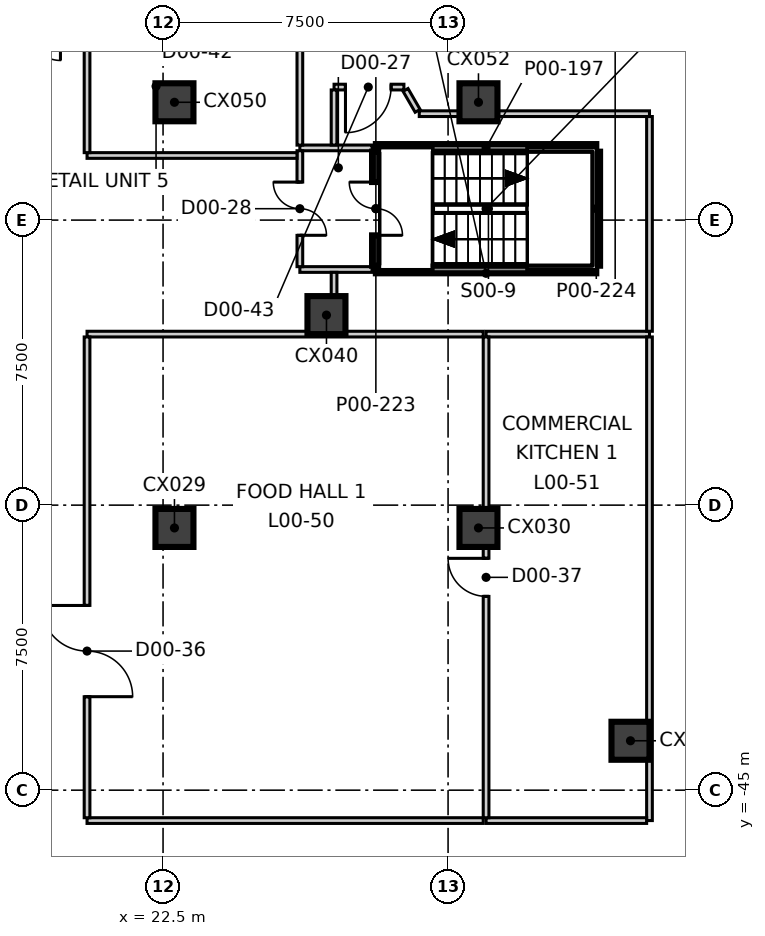
"""IFC4 building model, lengths in metres.
Left out: names, types, materials, properties, quantities, classifications, styles, units other than length and angle.
Written with IfcOpenShell. Run it as: python <this file> out.ifc"""

import sys

from ifc_helpers import new_model, si_unit, direction, frame, frame_2d, origin, origin_2d, place, context, subcontext, project, spatial, rectangle, extrude, element, fill, save


model = new_model("IFC4")
c1 = context("Model", 3, precision=1e-05, world=origin(), true_north=direction((0.0, 1.0)))
c2 = subcontext(c1, "Body", "Model", "MODEL_VIEW")
j1 = project(units=[si_unit("LENGTHUNIT", "METRE"), si_unit("PLANEANGLEUNIT", "RADIAN")], contexts=[c1])
p1 = place(None, origin())
s1 = spatial("IfcSite", under=j1, at=p1, CompositionType="ELEMENT")
p2 = place(p1, origin())
s2 = spatial("IfcBuilding", under=s1, at=p2, CompositionType="ELEMENT")
p3 = place(p2, origin())
s3 = spatial("IfcBuildingStorey", under=s2, at=p3, CompositionType="ELEMENT", Elevation=0.0)
for number, where, z_axis, x_axis in (
    (1, (34.8, -43.7, -0.4), (0.0, 0.0, 1.0), (1.0, 0.0, 0.0)),
    (2, (22.8, -38.1, -0.4), (0.0, 0.0, 1.0), (1.0, 0.0, 0.0)),
    (3, (30.8, -38.1, -0.4), (0.0, 0.0, 1.0), (1.0, 0.0, 0.0)),
    (4, (26.8, -32.5, -0.4), (0.0, 0.0, 1.0), (1.0, 0.0, 0.0)),
    (5, (22.8, -26.9, -0.4), (0.0, 0.0, 1.0), (1.0, 0.0, 0.0)),
    (6, (30.8, -26.9, -0.4), (0.0, 0.0, 1.0), (1.0, 0.0, 0.0)),
):
    element("IfcColumn", number, at=place(p3, frame(where, z_axis=z_axis, x_axis=x_axis)), inside=s3, PredefinedType="COLUMN", context=c2, shape_type="SweptSolid", body=[
        extrude(rectangle(XDim=1.0, YDim=1.0, at=origin_2d()), origin(), (0.0, 0.0, 1.0), 8.5),
    ])
for number, where, z_axis, x_axis in (
    (7, (26.1, -28.1, 0.0), (0.0, 0.0, 1.0), (1.0, 0.0, 0.0)),
    (8, (26.1, -31.3, 0.0), (0.0, 0.0, 1.0), (1.0, 0.0, 0.0)),
):
    element("IfcWall", number, at=place(p3, frame(where, z_axis=z_axis, x_axis=x_axis)), inside=s3, PredefinedType="PARTITIONING", context=c2, shape_type="SweptSolid", body=[
        extrude(rectangle(XDim=1.9, YDim=0.15, at=frame_2d((0.95, 0.0))), origin(), (0.0, 0.0, 1.0), 8.1),
    ])
p4 = place(p3, frame((26.1, -31.225, 0.0), z_axis=(0.0, 0.0, 1.0), x_axis=(0.0, 1.0, 0.0)))
e9 = element("IfcWall", 9, at=p4, inside=s3, PredefinedType="PARTITIONING", context=c2, shape_type="SweptSolid", body=[
    extrude(rectangle(XDim=3.05, YDim=0.15, at=frame_2d((1.525, 0.0))), origin(), (0.0, 0.0, 1.0), 8.1),
])
p5 = place(p4, frame((0.825, 0.0, 0.0)))
e10 = element("IfcOpeningElement", 10, at=p5, cuts=e9, PredefinedType="OPENING", context=c2, shape_type="SweptSolid", body=[
    extrude(rectangle(XDim=1.4, YDim=2.1, at=frame_2d((0.7, 1.05))), frame((0.0, 0.085, 0.0), z_axis=(0.0, -1.0, 0.0), x_axis=(1.0, 0.0, 0.0)), (0.0, 0.0, 1.0), 0.17),
])
p6 = place(p3, frame((31.0, -33.0, 0.0), z_axis=(0.0, 0.0, 1.0), x_axis=(1.0, 0.0, 0.0)))
e11 = element("IfcWall", 11, at=p6, inside=s3, PredefinedType="PARTITIONING", context=c2, shape_type="SweptSolid", body=[
    extrude(rectangle(XDim=4.3, YDim=0.15, at=frame_2d((2.15, 0.0))), origin(), (0.0, 0.0, 1.0), 8.1),
])
p7 = place(p3, frame((35.3, -45.8, 0.0), z_axis=(0.0, 0.0, 1.0), x_axis=(0.0, 1.0, 0.0)))
e12 = element("IfcWall", 12, at=p7, inside=s3, PredefinedType="PARTITIONING", context=c2, shape_type="SweptSolid", body=[
    extrude(rectangle(XDim=12.725, YDim=0.15, at=frame_2d((6.363, 0.0))), origin(), (0.0, 0.0, 1.0), 8.1),
])
p8 = place(p3, frame((31.0, -45.8, 0.0), z_axis=(0.0, 0.0, 1.0), x_axis=(1.0, 0.0, 0.0)))
e13 = element("IfcWall", 13, at=p8, inside=s3, PredefinedType="PARTITIONING", context=c2, shape_type="SweptSolid", body=[
    extrude(rectangle(XDim=4.225, YDim=0.15, at=frame_2d((2.113, 0.0))), origin(), (0.0, 0.0, 1.0), 8.1),
])
p9 = place(p3, frame((31.0, -45.725, 0.0), z_axis=(0.0, 0.0, 1.0), x_axis=(0.0, 1.0, 0.0)))
e14 = element("IfcWall", 14, at=p9, inside=s3, PredefinedType="PARTITIONING", context=c2, shape_type="SweptSolid", body=[
    extrude(rectangle(XDim=12.65, YDim=0.15, at=frame_2d((6.325, 0.0))), origin(), (0.0, 0.0, 1.0), 6.3),
])
p10 = place(p9, frame((5.825, 0.0, 0.0)))
e15 = element("IfcOpeningElement", 15, at=p10, cuts=e14, PredefinedType="OPENING", context=c2, shape_type="SweptSolid", body=[
    extrude(rectangle(XDim=1.0, YDim=2.1, at=frame_2d((0.5, 1.05))), frame((0.0, 0.085, 0.0), z_axis=(0.0, -1.0, 0.0), x_axis=(1.0, 0.0, 0.0)), (0.0, 0.0, 1.0), 0.17),
])
p11 = place(p3, frame((20.5, -33.0, 0.0), z_axis=(0.0, 0.0, 1.0), x_axis=(1.0, 0.0, 0.0)))
e16 = element("IfcWall", 16, at=p11, inside=s3, PredefinedType="PARTITIONING", context=c2, shape_type="SweptSolid", body=[
    extrude(rectangle(XDim=10.425, YDim=0.15, at=frame_2d((5.212, 0.0))), origin(), (0.0, 0.0, 1.0), 8.1),
])
p12 = place(p3, frame((29.242, -27.2, 0.0), z_axis=(0.0, 0.0, 1.0), x_axis=(1.0, 0.0, 0.0)))
e17 = element("IfcWall", 17, at=p12, inside=s3, PredefinedType="PARTITIONING", context=c2, shape_type="SweptSolid", body=[
    extrude(rectangle(XDim=6.058, YDim=0.15, at=frame_2d((3.029, 0.0))), origin(), (0.0, 0.0, 1.0), 6.6),
])
p13 = place(p3, frame((27.0, -26.5, 0.0), z_axis=(0.0, 0.0, 1.0), x_axis=(1.0, 0.0, 0.0)))
e18 = element("IfcWall", 18, at=p13, inside=s3, PredefinedType="PARTITIONING", context=c2, shape_type="SweptSolid", body=[
    extrude(rectangle(XDim=1.838, YDim=0.15, at=frame_2d((0.919, 0.0))), origin(), (0.0, 0.0, 1.0), 8.1),
])
p14 = place(p13, frame((0.3, 0.0, 0.0)))
e19 = element("IfcOpeningElement", 19, at=p14, cuts=e18, PredefinedType="OPENING", context=c2, shape_type="SweptSolid", body=[
    extrude(rectangle(XDim=1.2, YDim=2.1, at=frame_2d((0.6, 1.05))), frame((0.0, 0.085, 0.0), z_axis=(0.0, -1.0, 0.0), x_axis=(1.0, 0.0, 0.0)), (0.0, 0.0, 1.0), 0.17),
])
p15 = place(p3, frame((20.5, -45.8, 0.0), z_axis=(0.0, 0.0, 1.0), x_axis=(1.0, 0.0, 0.0)))
e20 = element("IfcWall", 20, at=p15, inside=s3, PredefinedType="PARTITIONING", context=c2, shape_type="SweptSolid", body=[
    extrude(rectangle(XDim=10.425, YDim=0.15, at=frame_2d((5.212, 0.0))), origin(), (0.0, 0.0, 1.0), 8.1),
])
p16 = place(p3, frame((20.5, -28.3, 0.0), z_axis=(0.0, 0.0, 1.0), x_axis=(1.0, 0.0, 0.0)))
e21 = element("IfcWall", 21, at=p16, inside=s3, PredefinedType="PARTITIONING", context=c2, shape_type="SweptSolid", body=[
    extrude(rectangle(XDim=5.525, YDim=0.15, at=frame_2d((2.762, 0.0))), origin(), (0.0, 0.0, 1.0), 8.1),
])
p17 = place(p3, frame((20.5, -45.725, 0.0), z_axis=(0.0, 0.0, 1.0), x_axis=(0.0, 1.0, 0.0)))
e22 = element("IfcWall", 22, at=p17, inside=s3, PredefinedType="PARTITIONING", context=c2, shape_type="SweptSolid", body=[
    extrude(rectangle(XDim=12.65, YDim=0.15, at=frame_2d((6.325, 0.0))), origin(), (0.0, 0.0, 1.0), 8.1),
])
p18 = place(p17, frame((3.185, 0.0, 0.0)))
e23 = element("IfcOpeningElement", 23, at=p18, cuts=e22, PredefinedType="OPENING", context=c2, shape_type="SweptSolid", body=[
    extrude(rectangle(XDim=2.4, YDim=2.1, at=frame_2d((1.2, 1.05))), frame((0.0, 0.085, 0.0), z_axis=(0.0, -1.0, 0.0), x_axis=(1.0, 0.0, 0.0)), (0.0, 0.0, 1.0), 0.17),
])
p19 = place(p3, frame((20.5, -28.225, 0.0), z_axis=(0.0, 0.0, 1.0), x_axis=(0.0, 1.0, 0.0)))
e24 = element("IfcWall", 24, at=p19, inside=s3, PredefinedType="PARTITIONING", context=c2, shape_type="SweptSolid", body=[
    extrude(rectangle(XDim=3.152, YDim=0.15, at=frame_2d((1.576, 0.0))), origin(), (0.0, 0.0, 1.0), 8.1),
])
p20 = place(p3, frame((26.1, -28.027, 0.0), z_axis=(0.0, 0.0, 1.0), x_axis=(0.0, 1.0, 0.0)))
e25 = element("IfcWall", 25, at=p20, inside=s3, PredefinedType="PARTITIONING", context=c2, shape_type="SweptSolid", body=[
    extrude(rectangle(XDim=3.952, YDim=0.15, at=frame_2d((1.976, 0.0))), origin(), (0.0, 0.0, 1.0), 8.1),
])
p21 = place(p3, frame((27.0, -32.925, 0.0), z_axis=(0.0, 0.0, 1.0), x_axis=(0.0, 1.0, 0.0)))
e26 = element("IfcWall", 26, at=p21, inside=s3, PredefinedType="PARTITIONING", context=c2, shape_type="SweptSolid", body=[
    extrude(rectangle(XDim=1.55, YDim=0.15, at=frame_2d((0.775, 0.0))), origin(), (0.0, 0.0, 1.0), 8.1),
])
p22 = place(p3, frame((27.0, -28.025, 0.0), z_axis=(0.0, 0.0, 1.0), x_axis=(0.0, 1.0, 0.0)))
e27 = element("IfcWall", 27, at=p22, inside=s3, PredefinedType="PARTITIONING", context=c2, shape_type="SweptSolid", body=[
    extrude(rectangle(XDim=1.45, YDim=0.15, at=frame_2d((0.725, 0.0))), origin(), (0.0, 0.0, 1.0), 8.1),
])
p23 = place(p3, frame((28.881, -26.575, 0.0), z_axis=(0.0, 0.0, 1.0), x_axis=(0.500354426808, -0.865820678647, 0.0)))
e28 = element("IfcWall", 28, at=p23, inside=s3, PredefinedType="PARTITIONING", context=c2, shape_type="SweptSolid", body=[
    extrude(rectangle(XDim=0.635, YDim=0.15, at=frame_2d((0.318, 0.0))), origin(), (0.0, 0.0, 1.0), 8.1),
])
p24 = place(p3, frame((35.3, -32.925, 0.0), z_axis=(0.0, 0.0, 1.0), x_axis=(0.0, 1.0, 0.0)))
e29 = element("IfcWall", 29, at=p24, inside=s3, PredefinedType="PARTITIONING", context=c2, shape_type="SweptSolid", body=[
    extrude(rectangle(XDim=5.65, YDim=0.15, at=frame_2d((2.825, 0.0))), origin(), (0.0, 0.0, 1.0), 8.1),
])
for number, where, z_axis, x_axis in (
    (30, (28.1, -31.3, 0.0), (0.0, 0.0, 1.0), (1.0, 0.0, 0.0)),
    (31, (28.1, -28.1, 0.0), (0.0, 0.0, 1.0), (1.0, 0.0, 0.0)),
):
    element("IfcWall", number, at=place(p3, frame(where, z_axis=z_axis, x_axis=x_axis)), inside=s3, PredefinedType="SOLIDWALL", context=c2, shape_type="SweptSolid", body=[
        extrude(rectangle(XDim=5.8, YDim=0.2, at=frame_2d((2.9, 0.0))), origin(), (0.0, 0.0, 1.0), 8.1),
    ])
p25 = place(p3, frame((28.1, -31.2, 0.0), z_axis=(0.0, 0.0, 1.0), x_axis=(0.0, 1.0, 0.0)))
e32 = element("IfcWall", 32, at=p25, inside=s3, PredefinedType="SOLIDWALL", context=c2, shape_type="SweptSolid", body=[
    extrude(rectangle(XDim=3.0, YDim=0.2, at=frame_2d((1.5, 0.0))), origin(), (0.0, 0.0, 1.0), 8.1),
])
p26 = place(p25, frame((0.8, 0.0, 0.0)))
e33 = element("IfcOpeningElement", 33, at=p26, cuts=e32, PredefinedType="OPENING", context=c2, shape_type="SweptSolid", body=[
    extrude(rectangle(XDim=1.4, YDim=2.1, at=frame_2d((0.7, 1.05))), frame((0.0, 0.11, 0.0), z_axis=(0.0, -1.0, 0.0), x_axis=(1.0, 0.0, 0.0)), (0.0, 0.0, 1.0), 0.22),
])
p27 = place(p3, frame((33.9, -31.2, 0.0), z_axis=(0.0, 0.0, 1.0), x_axis=(0.0, 1.0, 0.0)))
e34 = element("IfcWall", 34, at=p27, inside=s3, PredefinedType="SOLIDWALL", context=c2, shape_type="SweptSolid", body=[
    extrude(rectangle(XDim=3.0, YDim=0.2, at=frame_2d((1.5, 0.0))), origin(), (0.0, 0.0, 1.0), 8.1),
])
p28 = place(p26, origin())
e35 = element("IfcDoor", 35, at=p28, inside=s3, OperationType="DOUBLE_DOOR_SINGLE_SWING", PredefinedType="DOOR", context=c2, shape_type="SweptSolid", body=[
    extrude(rectangle(XDim=1.4, YDim=2.1, at=frame_2d((0.7, 1.05))), frame((0.0, 0.025, 0.0), z_axis=(0.0, -1.0, 0.0), x_axis=(1.0, 0.0, 0.0)), (0.0, 0.0, 1.0), 0.05),
])
fill(e33, e35)
p29 = place(p5, origin())
e36 = element("IfcDoor", 36, at=p29, inside=s3, OperationType="DOUBLE_DOOR_SINGLE_SWING", PredefinedType="DOOR", context=c2, shape_type="SweptSolid", body=[
    extrude(rectangle(XDim=1.4, YDim=2.1, at=frame_2d((0.7, 1.05))), frame((0.0, 0.025, 0.0), z_axis=(0.0, -1.0, 0.0), x_axis=(1.0, 0.0, 0.0)), (0.0, 0.0, 1.0), 0.05),
])
fill(e10, e36)
p30 = place(p18, origin())
e37 = element("IfcDoor", 37, at=p30, inside=s3, OperationType="DOUBLE_DOOR_SINGLE_SWING", PredefinedType="DOOR", context=c2, shape_type="SweptSolid", body=[
    extrude(rectangle(XDim=2.4, YDim=2.1, at=frame_2d((1.2, 1.05))), frame((0.0, 0.025, 0.0), z_axis=(0.0, -1.0, 0.0), x_axis=(1.0, 0.0, 0.0)), (0.0, 0.0, 1.0), 0.05),
])
fill(e23, e37)
p31 = place(p10, origin())
e38 = element("IfcDoor", 38, at=p31, inside=s3, OperationType="SINGLE_SWING_LEFT", PredefinedType="DOOR", context=c2, shape_type="SweptSolid", body=[
    extrude(rectangle(XDim=1.0, YDim=2.1, at=frame_2d((0.5, 1.05))), frame((0.0, 0.025, 0.0), z_axis=(0.0, -1.0, 0.0), x_axis=(1.0, 0.0, 0.0)), (0.0, 0.0, 1.0), 0.05),
])
fill(e15, e38)
p32 = place(p14, origin())
e39 = element("IfcDoor", 39, at=p32, inside=s3, OperationType="SINGLE_SWING_LEFT", PredefinedType="DOOR", context=c2, shape_type="SweptSolid", body=[
    extrude(rectangle(XDim=1.2, YDim=2.1, at=frame_2d((0.6, 1.05))), frame((0.0, 0.025, 0.0), z_axis=(0.0, -1.0, 0.0), x_axis=(1.0, 0.0, 0.0)), (0.0, 0.0, 1.0), 0.05),
])
fill(e19, e39)
save(model, sys.argv[1])
